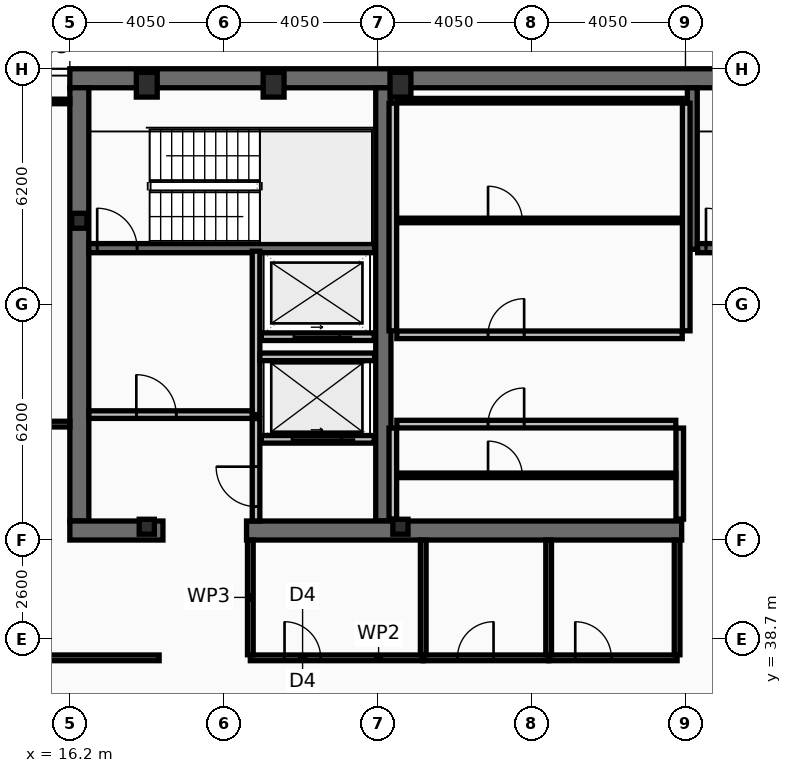
"""IFC4 building model, lengths in metres.
Left out: names, types, materials, properties, quantities, classifications, styles, units other than length and angle.
Written with IfcOpenShell. Run it as: python <this file> out.ifc"""

import sys

from ifc_helpers import new_model, si_unit, direction, frame, frame_2d, origin, origin_2d, place, context, subcontext, project, spatial, rectangle, hollow_rectangle, i_section, extrude, element, fill, save


model = new_model("IFC4")
c1 = context("Model", 3, precision=1e-05, world=origin(), true_north=direction((0.0, 1.0)))
c2 = subcontext(c1, "Body", "Model", "MODEL_VIEW")
j1 = project(units=[si_unit("LENGTHUNIT", "METRE"), si_unit("PLANEANGLEUNIT", "RADIAN")], contexts=[c1])
p1 = place(None, origin())
s1 = spatial("IfcSite", under=j1, at=p1, CompositionType="ELEMENT")
p2 = place(p1, origin())
s2 = spatial("IfcBuilding", under=s1, at=p2, CompositionType="ELEMENT")
p3 = place(p2, frame((0.0, 0.0, 332.6)))
s3 = spatial("IfcBuildingStorey", under=s2, at=p3, CompositionType="ELEMENT", Elevation=332.6)
p4 = place(p3, frame((16.2, 53.45, 0.0), z_axis=(0.0, 0.0, 1.0), x_axis=(1.0, 0.0, 0.0)))
e1 = element("IfcWall", 1, at=p4, inside=s3, PredefinedType="SHEAR", context=c2, shape_type="SweptSolid", body=[
    extrude(rectangle(XDim=40.5, YDim=0.5, at=frame_2d((20.25, 0.0))), origin(), (0.0, 0.0, 1.0), 3.44),
])
p5 = place(p3, frame((16.45, 41.8, 0.0), z_axis=(0.0, 0.0, 1.0), x_axis=(0.0, 1.0, 0.0)))
e2 = element("IfcWall", 2, at=p5, inside=s3, PredefinedType="SHEAR", context=c2, shape_type="SweptSolid", body=[
    extrude(rectangle(XDim=11.4, YDim=0.5, at=frame_2d((5.7, 0.0))), origin(), (0.0, 0.0, 1.0), 3.44),
])
p6 = place(p3, frame((24.45, 41.8, 0.0), z_axis=(0.0, 0.0, 1.0), x_axis=(0.0, 1.0, 0.0)))
e3 = element("IfcWall", 3, at=p6, inside=s3, PredefinedType="SHEAR", context=c2, shape_type="SweptSolid", body=[
    extrude(rectangle(XDim=11.4, YDim=0.4, at=frame_2d((5.7, 0.0))), origin(), (0.0, 0.0, 1.0), 3.44),
])
p7 = place(p3, frame((18.65, 41.55, 0.0), z_axis=(0.0, 0.0, 1.0), x_axis=(-1.0, 0.0, 0.0)))
e4 = element("IfcWall", 4, at=p7, inside=s3, PredefinedType="SHEAR", context=c2, shape_type="SweptSolid", body=[
    extrude(rectangle(XDim=2.45, YDim=0.5, at=frame_2d((1.225, 0.0))), origin(), (0.0, 0.0, 1.0), 3.44),
])
p8 = place(p3, frame((32.3, 41.55, 0.0), z_axis=(0.0, 0.0, 1.0), x_axis=(-1.0, 0.0, 0.0)))
e5 = element("IfcWall", 5, at=p8, inside=s3, PredefinedType="SHEAR", context=c2, shape_type="SweptSolid", body=[
    extrude(rectangle(XDim=11.45, YDim=0.5, at=frame_2d((5.725, 0.0))), origin(), (0.0, 0.0, 1.0), 3.44),
])
p9 = place(p3, frame((32.58, 48.95, 0.0), z_axis=(0.0, 0.0, 1.0), x_axis=(0.0, 1.0, 0.0)))
e6 = element("IfcWall", 6, at=p9, inside=s3, PredefinedType="SHEAR", context=c2, shape_type="SweptSolid", body=[
    extrude(rectangle(XDim=4.25, YDim=0.26, at=frame_2d((2.125, 0.0))), origin(), (0.0, 0.0, 1.0), 3.44),
])
p10 = place(p3, frame((16.7, 48.98, 0.0), z_axis=(0.0, 0.0, 1.0), x_axis=(1.0, 0.0, 0.0)))
e7 = element("IfcWall", 7, at=p10, inside=s3, PredefinedType="SHEAR", context=c2, shape_type="SweptSolid", body=[
    extrude(rectangle(XDim=7.52, YDim=0.24, at=frame_2d((3.76, 0.0))), origin(), (0.0, 0.0, 1.0), 3.44),
])
p11 = place(p10, frame((0.22, 0.0, 0.0)))
e8 = element("IfcOpeningElement", 8, at=p11, cuts=e7, PredefinedType="OPENING", context=c2, shape_type="SweptSolid", body=[
    extrude(rectangle(XDim=1.05, YDim=2.15, at=frame_2d((0.525, 1.075))), frame((0.0, 0.13, 0.0), z_axis=(0.0, -1.0, 0.0), x_axis=(1.0, 0.0, 0.0)), (0.0, 0.0, 1.0), 0.26),
])
p12 = place(p3, frame((32.72, 48.98, 0.0), z_axis=(0.0, 0.0, 1.0), x_axis=(1.0, 0.0, 0.0)))
e9 = element("IfcWall", 9, at=p12, inside=s3, PredefinedType="SHEAR", context=c2, shape_type="SweptSolid", body=[
    extrude(rectangle(XDim=7.56, YDim=0.24, at=frame_2d((3.78, 0.0))), origin(), (0.0, 0.0, 1.0), 3.44),
])
p13 = place(p12, frame((0.22, 0.0, 0.0)))
e10 = element("IfcOpeningElement", 10, at=p13, cuts=e9, PredefinedType="OPENING", context=c2, shape_type="SweptSolid", body=[
    extrude(rectangle(XDim=1.05, YDim=2.15, at=frame_2d((0.525, 1.075))), frame((0.0, 0.13, 0.0), z_axis=(0.0, -1.0, 0.0), x_axis=(1.0, 0.0, 0.0)), (0.0, 0.0, 1.0), 0.26),
])
for number, where, z_axis, x_axis in (
    (11, (18.225, 53.28, 0.0), (0.0, 0.0, 1.0), (1.0, 0.0, 0.0)),
    (12, (21.562, 53.28, 0.0), (0.0, 0.0, 1.0), (1.0, 0.0, 0.0)),
    (13, (24.9, 53.28, 0.0), (0.0, 0.0, 1.0), (1.0, 0.0, 0.0)),
):
    element("IfcColumn", number, at=place(p3, frame(where, z_axis=z_axis, x_axis=x_axis)), inside=s3, PredefinedType="COLUMN", context=c2, shape_type="SweptSolid", body=[
        extrude(hollow_rectangle(XDim=0.55, YDim=0.65, WallThickness=0.04, at=origin_2d()), origin(), (0.0, 0.0, 1.0), 3.6),
    ])
for number, where, z_axis, x_axis in (
    (14, (16.45, 49.7, 0.0), (0.0, 0.0, 1.0), (1.0, 0.0, 0.0)),
    (15, (18.225, 41.65, 0.0), (0.0, 0.0, 1.0), (1.0, 0.0, 0.0)),
    (16, (24.9, 41.65, 0.0), (0.0, 0.0, 1.0), (1.0, 0.0, 0.0)),
):
    element("IfcColumn", number, at=place(p3, frame(where, z_axis=z_axis, x_axis=x_axis)), inside=s3, PredefinedType="COLUMN", context=c2, shape_type="SweptSolid", body=[
        extrude(i_section(OverallWidth=0.399, OverallDepth=0.393, WebThickness=0.023, FlangeThickness=0.037, at=origin_2d()), origin(), (0.0, 0.0, 1.0), 3.6),
    ])
p14 = place(p3, frame((24.21, 43.95, 0.0), z_axis=(0.0, 0.0, 1.0), x_axis=(-1.0, 0.0, 0.0)))
e17 = element("IfcWall", 17, at=p14, inside=s3, PredefinedType="PARTITIONING", context=c2, shape_type="SweptSolid", body=[
    extrude(rectangle(XDim=2.97, YDim=0.2, at=frame_2d((1.485, 0.0))), origin(), (0.0, 0.0, 1.0), 3.44),
])
p15 = place(p14, frame((0.86, 0.0, 0.0)))
e18 = element("IfcOpeningElement", 18, at=p15, cuts=e17, PredefinedType="OPENING", context=c2, shape_type="SweptSolid", body=[
    extrude(rectangle(XDim=1.3, YDim=2.18, at=frame_2d((0.65, 1.09))), frame((0.0, 0.11, 0.0), z_axis=(0.0, -1.0, 0.0), x_axis=(1.0, 0.0, 0.0)), (0.0, 0.0, 1.0), 0.22),
])
p16 = place(p3, frame((24.21, 46.65, 0.0), z_axis=(0.0, 0.0, 1.0), x_axis=(-1.0, 0.0, 0.0)))
e19 = element("IfcWall", 19, at=p16, inside=s3, PredefinedType="PARTITIONING", context=c2, shape_type="SweptSolid", body=[
    extrude(rectangle(XDim=2.97, YDim=0.2, at=frame_2d((1.485, 0.0))), origin(), (0.0, 0.0, 1.0), 3.44),
])
p17 = place(p16, frame((0.91, 0.0, 0.0)))
e20 = element("IfcOpeningElement", 20, at=p17, cuts=e19, PredefinedType="OPENING", context=c2, shape_type="SweptSolid", body=[
    extrude(rectangle(XDim=1.2, YDim=2.18, at=frame_2d((0.6, 1.09))), frame((0.0, 0.11, 0.0), z_axis=(0.0, -1.0, 0.0), x_axis=(1.0, 0.0, 0.0)), (0.0, 0.0, 1.0), 0.22),
])
p18 = place(p3, frame((21.1, 44.6, 0.0), z_axis=(0.0, 0.0, 1.0), x_axis=(0.0, 1.0, 0.0)))
e21 = element("IfcWall", 21, at=p18, inside=s3, PredefinedType="PARTITIONING", context=c2, shape_type="SweptSolid", body=[
    extrude(rectangle(XDim=4.3, YDim=0.2, at=frame_2d((2.15, 0.0))), origin(), (0.0, 0.0, 1.0), 3.44),
])
p19 = place(p3, frame((16.7, 44.6, 0.0), z_axis=(0.0, 0.0, 1.0), x_axis=(1.0, 0.0, 0.0)))
e22 = element("IfcWall", 22, at=p19, inside=s3, PredefinedType="PARTITIONING", context=c2, shape_type="SweptSolid", body=[
    extrude(rectangle(XDim=4.3, YDim=0.2, at=frame_2d((2.15, 0.0))), origin(), (0.0, 0.0, 1.0), 3.44),
])
p20 = place(p19, frame((1.25, 0.0, 0.0)))
e23 = element("IfcOpeningElement", 23, at=p20, cuts=e22, PredefinedType="OPENING", context=c2, shape_type="SweptSolid", body=[
    extrude(rectangle(XDim=1.05, YDim=2.15, at=frame_2d((0.525, 1.075))), frame((0.0, 0.11, 0.0), z_axis=(0.0, -1.0, 0.0), x_axis=(1.0, 0.0, 0.0)), (0.0, 0.0, 1.0), 0.22),
])
p21 = place(p3, frame((21.2, 46.12, 0.0), z_axis=(0.0, 0.0, 1.0), x_axis=(1.0, 0.0, 0.0)))
e24 = element("IfcWall", 24, at=p21, inside=s3, PredefinedType="PARTITIONING", context=c2, shape_type="SweptSolid", body=[
    extrude(rectangle(XDim=3.02, YDim=0.2, at=frame_2d((1.51, 0.0))), origin(), (0.0, 0.0, 1.0), 3.44),
])
p22 = place(p3, frame((21.1, 41.8, 0.0), z_axis=(0.0, 0.0, 1.0), x_axis=(0.0, 1.0, 0.0)))
e25 = element("IfcWall", 25, at=p22, inside=s3, PredefinedType="PARTITIONING", context=c2, shape_type="SweptSolid", body=[
    extrude(rectangle(XDim=2.695, YDim=0.2, at=frame_2d((1.348, 0.0))), origin(), (0.0, 0.0, 1.0), 3.44),
])
p23 = place(p22, frame((0.38, 0.0, 0.0)))
e26 = element("IfcOpeningElement", 26, at=p23, cuts=e25, PredefinedType="OPENING", context=c2, shape_type="SweptSolid", body=[
    extrude(rectangle(XDim=1.05, YDim=2.15, at=frame_2d((0.525, 1.075))), frame((0.0, 0.11, 0.0), z_axis=(0.0, -1.0, 0.0), x_axis=(1.0, 0.0, 0.0)), (0.0, 0.0, 1.0), 0.22),
])
for number, where, z_axis, x_axis in (
    (27, (24.7, 46.805, 0.0), (0.0, 0.0, 1.0), (0.0, 1.0, 0.0)),
    (28, (32.42, 46.805, 0.0), (0.0, 0.0, 1.0), (0.0, 1.0, 0.0)),
):
    element("IfcWall", number, at=place(p3, frame(where, z_axis=z_axis, x_axis=x_axis)), inside=s3, PredefinedType="PARTITIONING", context=c2, shape_type="SweptSolid", body=[
        extrude(rectangle(XDim=5.99, YDim=0.2, at=frame_2d((2.995, 0.0))), origin(), (0.0, 0.0, 1.0), 3.44),
    ])
p24 = place(p3, frame((24.805, 52.86, 0.0), z_axis=(0.0, 0.0, 1.0), x_axis=(1.0, 0.0, 0.0)))
e29 = element("IfcWall", 29, at=p24, inside=s3, PredefinedType="PARTITIONING", context=c2, shape_type="SweptSolid", body=[
    extrude(rectangle(XDim=7.51, YDim=0.12, at=frame_2d((3.755, 0.0))), origin(), (0.0, 0.0, 1.0), 3.44),
])
p25 = place(p3, frame((24.805, 49.709, 0.0), z_axis=(0.0, 0.0, 1.0), x_axis=(1.0, 0.0, 0.0)))
e30 = element("IfcWall", 30, at=p25, inside=s3, PredefinedType="PARTITIONING", context=c2, shape_type="SweptSolid", body=[
    extrude(rectangle(XDim=7.51, YDim=0.12, at=frame_2d((3.755, 0.0))), origin(), (0.0, 0.0, 1.0), 3.44),
])
p26 = place(p25, frame((2.4, 0.0, 0.0)))
e31 = element("IfcOpeningElement", 31, at=p26, cuts=e30, PredefinedType="OPENING", context=c2, shape_type="SweptSolid", body=[
    extrude(rectangle(XDim=0.9, YDim=2.05, at=frame_2d((0.45, 1.025))), frame((0.0, 0.07, 0.0), z_axis=(0.0, -1.0, 0.0), x_axis=(1.0, 0.0, 0.0)), (0.0, 0.0, 1.0), 0.14),
])
p27 = place(p3, frame((24.805, 46.7, 0.0), z_axis=(0.0, 0.0, 1.0), x_axis=(1.0, 0.0, 0.0)))
e32 = element("IfcWall", 32, at=p27, inside=s3, PredefinedType="PARTITIONING", context=c2, shape_type="SweptSolid", body=[
    extrude(rectangle(XDim=7.51, YDim=0.2, at=frame_2d((3.755, 0.0))), origin(), (0.0, 0.0, 1.0), 3.44),
])
p28 = place(p27, frame((2.4, 0.0, 0.0)))
e33 = element("IfcOpeningElement", 33, at=p28, cuts=e32, PredefinedType="OPENING", context=c2, shape_type="SweptSolid", body=[
    extrude(rectangle(XDim=0.95, YDim=2.1, at=frame_2d((0.475, 1.05))), frame((0.0, 0.11, 0.0), z_axis=(0.0, -1.0, 0.0), x_axis=(1.0, 0.0, 0.0)), (0.0, 0.0, 1.0), 0.22),
])
for number, where, z_axis, x_axis in (
    (34, (24.7, 41.85, 0.0), (0.0, 0.0, 1.0), (0.0, 1.0, 0.0)),
    (35, (32.25, 41.85, 0.0), (0.0, 0.0, 1.0), (0.0, 1.0, 0.0)),
):
    element("IfcWall", number, at=place(p3, frame(where, z_axis=z_axis, x_axis=x_axis)), inside=s3, PredefinedType="PARTITIONING", context=c2, shape_type="SweptSolid", body=[
        extrude(rectangle(XDim=2.395, YDim=0.2, at=frame_2d((1.198, 0.0))), origin(), (0.0, 0.0, 1.0), 3.44),
    ])
p29 = place(p3, frame((24.805, 43.002, 0.0), z_axis=(0.0, 0.0, 1.0), x_axis=(1.0, 0.0, 0.0)))
e36 = element("IfcWall", 36, at=p29, inside=s3, PredefinedType="PARTITIONING", context=c2, shape_type="SweptSolid", body=[
    extrude(rectangle(XDim=7.34, YDim=0.12, at=frame_2d((3.67, 0.0))), origin(), (0.0, 0.0, 1.0), 3.44),
])
p30 = place(p29, frame((2.4, 0.0, 0.0)))
e37 = element("IfcOpeningElement", 37, at=p30, cuts=e36, PredefinedType="OPENING", context=c2, shape_type="SweptSolid", body=[
    extrude(rectangle(XDim=0.9, YDim=2.05, at=frame_2d((0.45, 1.025))), frame((0.0, 0.07, 0.0), z_axis=(0.0, -1.0, 0.0), x_axis=(1.0, 0.0, 0.0)), (0.0, 0.0, 1.0), 0.14),
])
p31 = place(p3, frame((24.805, 44.35, 0.0), z_axis=(0.0, 0.0, 1.0), x_axis=(1.0, 0.0, 0.0)))
e38 = element("IfcWall", 38, at=p31, inside=s3, PredefinedType="PARTITIONING", context=c2, shape_type="SweptSolid", body=[
    extrude(rectangle(XDim=7.34, YDim=0.2, at=frame_2d((3.67, 0.0))), origin(), (0.0, 0.0, 1.0), 3.44),
])
p32 = place(p31, frame((2.4, 0.0, 0.0)))
e39 = element("IfcOpeningElement", 39, at=p32, cuts=e38, PredefinedType="OPENING", context=c2, shape_type="SweptSolid", body=[
    extrude(rectangle(XDim=0.95, YDim=2.1, at=frame_2d((0.475, 1.05))), frame((0.0, 0.11, 0.0), z_axis=(0.0, -1.0, 0.0), x_axis=(1.0, 0.0, 0.0)), (0.0, 0.0, 1.0), 0.22),
])
p33 = place(p3, frame((20.95, 38.2, 0.0), z_axis=(0.0, 0.0, 1.0), x_axis=(1.0, 0.0, 0.0)))
e40 = element("IfcWall", 40, at=p33, inside=s3, PredefinedType="PARTITIONING", context=c2, shape_type="SweptSolid", body=[
    extrude(rectangle(XDim=4.55, YDim=0.15, at=frame_2d((2.275, 0.0))), origin(), (0.0, 0.0, 1.0), 2.83),
])
p34 = place(p33, frame((0.9, 0.0, 0.0)))
e41 = element("IfcOpeningElement", 41, at=p34, cuts=e40, PredefinedType="OPENING", context=c2, shape_type="SweptSolid", body=[
    extrude(rectangle(XDim=0.95, YDim=2.05, at=frame_2d((0.475, 1.025))), frame((0.0, 0.085, 0.0), z_axis=(0.0, -1.0, 0.0), x_axis=(1.0, 0.0, 0.0)), (0.0, 0.0, 1.0), 0.17),
])
p35 = place(p3, frame((25.5, 38.2, 0.0), z_axis=(0.0, 0.0, 1.0), x_axis=(1.0, 0.0, 0.0)))
e42 = element("IfcWall", 42, at=p35, inside=s3, PredefinedType="PARTITIONING", context=c2, shape_type="SweptSolid", body=[
    extrude(rectangle(XDim=3.3, YDim=0.15, at=frame_2d((1.65, 0.0))), origin(), (0.0, 0.0, 1.0), 3.44),
])
p36 = place(p35, frame((0.9, 0.0, 0.0)))
e43 = element("IfcOpeningElement", 43, at=p36, cuts=e42, PredefinedType="OPENING", context=c2, shape_type="SweptSolid", body=[
    extrude(rectangle(XDim=0.95, YDim=2.05, at=frame_2d((0.475, 1.025))), frame((0.0, 0.085, 0.0), z_axis=(0.0, -1.0, 0.0), x_axis=(1.0, 0.0, 0.0)), (0.0, 0.0, 1.0), 0.17),
])
p37 = place(p3, frame((28.8, 38.2, 0.0), z_axis=(0.0, 0.0, 1.0), x_axis=(1.0, 0.0, 0.0)))
e44 = element("IfcWall", 44, at=p37, inside=s3, PredefinedType="PARTITIONING", context=c2, shape_type="SweptSolid", body=[
    extrude(rectangle(XDim=3.38, YDim=0.15, at=frame_2d((1.69, 0.0))), origin(), (0.0, 0.0, 1.0), 3.44),
])
p38 = place(p37, frame((0.7, 0.0, 0.0)))
e45 = element("IfcOpeningElement", 45, at=p38, cuts=e44, PredefinedType="OPENING", context=c2, shape_type="SweptSolid", body=[
    extrude(rectangle(XDim=0.95, YDim=2.05, at=frame_2d((0.475, 1.025))), frame((0.0, 0.085, 0.0), z_axis=(0.0, -1.0, 0.0), x_axis=(1.0, 0.0, 0.0)), (0.0, 0.0, 1.0), 0.17),
])
for number, where, z_axis, x_axis in (
    (46, (20.95, 38.28, 0.0), (0.0, 0.0, 1.0), (0.0, 1.0, 0.0)),
    (47, (25.5, 38.28, 0.0), (0.0, 0.0, 1.0), (0.0, 1.0, 0.0)),
    (48, (28.8, 38.28, 0.0), (0.0, 0.0, 1.0), (0.0, 1.0, 0.0)),
    (49, (32.18, 38.28, 0.0), (0.0, 0.0, 1.0), (0.0, 1.0, 0.0)),
):
    element("IfcWall", number, at=place(p3, frame(where, z_axis=z_axis, x_axis=x_axis)), inside=s3, PredefinedType="PARTITIONING", context=c2, shape_type="SweptSolid", body=[
        extrude(rectangle(XDim=3.02, YDim=0.15, at=frame_2d((1.51, 0.0))), origin(), (0.0, 0.0, 1.0), 3.44),
    ])
p39 = place(p3, frame((12.03, 38.2, 0.0), z_axis=(0.0, 0.0, 1.0), x_axis=(1.0, 0.0, 0.0)))
e50 = element("IfcWall", 50, at=p39, inside=s3, PredefinedType="PARTITIONING", context=c2, shape_type="SweptSolid", body=[
    extrude(rectangle(XDim=6.52, YDim=0.15, at=frame_2d((3.26, 0.0))), origin(), (0.0, 0.0, 1.0), 2.83),
])
p40 = place(p39, frame((2.32, 0.0, 0.0)))
e51 = element("IfcOpeningElement", 51, at=p40, cuts=e50, PredefinedType="OPENING", context=c2, shape_type="SweptSolid", body=[
    extrude(rectangle(XDim=0.95, YDim=2.05, at=frame_2d((0.475, 1.025))), frame((0.0, 0.085, 0.0), z_axis=(0.0, -1.0, 0.0), x_axis=(1.0, 0.0, 0.0)), (0.0, 0.0, 1.0), 0.17),
])
p41 = place(p3, frame((12.095, 44.35, 0.0), z_axis=(0.0, 0.0, 1.0), x_axis=(1.0, 0.0, 0.0)))
e52 = element("IfcWall", 52, at=p41, inside=s3, PredefinedType="PARTITIONING", context=c2, shape_type="SweptSolid", body=[
    extrude(rectangle(XDim=4.105, YDim=0.15, at=frame_2d((2.052, 0.0))), origin(), (0.0, 0.0, 1.0), 2.88),
])
p42 = place(p41, frame((2.32, 0.0, 0.0)))
e53 = element("IfcOpeningElement", 53, at=p42, cuts=e52, PredefinedType="OPENING", context=c2, shape_type="SweptSolid", body=[
    extrude(rectangle(XDim=0.9, YDim=2.05, at=frame_2d((0.45, 1.025))), frame((0.0, 0.085, 0.0), z_axis=(0.0, -1.0, 0.0), x_axis=(1.0, 0.0, 0.0)), (0.0, 0.0, 1.0), 0.17),
])
p43 = place(p3, frame((12.095, 52.84, 0.0), z_axis=(0.0, 0.0, 1.0), x_axis=(1.0, 0.0, 0.0)))
e54 = element("IfcWall", 54, at=p43, inside=s3, PredefinedType="PARTITIONING", context=c2, shape_type="SweptSolid", body=[
    extrude(rectangle(XDim=4.105, YDim=0.12, at=frame_2d((2.052, 0.0))), origin(), (0.0, 0.0, 1.0), 3.44),
])
p44 = place(p11, origin())
e55 = element("IfcDoor", 55, at=p44, inside=s3, OperationType="SINGLE_SWING_LEFT", PredefinedType="DOOR", context=c2, shape_type="SweptSolid", body=[
    extrude(rectangle(XDim=1.05, YDim=2.15, at=frame_2d((0.525, 1.075))), frame((0.0, 0.025, 0.0), z_axis=(0.0, -1.0, 0.0), x_axis=(1.0, 0.0, 0.0)), (0.0, 0.0, 1.0), 0.05),
])
fill(e8, e55)
p45 = place(p13, origin())
e56 = element("IfcDoor", 56, at=p45, inside=s3, OperationType="SINGLE_SWING_LEFT", PredefinedType="DOOR", context=c2, shape_type="SweptSolid", body=[
    extrude(rectangle(XDim=1.05, YDim=2.15, at=frame_2d((0.525, 1.075))), frame((0.0, 0.025, 0.0), z_axis=(0.0, -1.0, 0.0), x_axis=(1.0, 0.0, 0.0)), (0.0, 0.0, 1.0), 0.05),
])
fill(e10, e56)
p46 = place(p15, origin())
e57 = element("IfcDoor", 57, at=p46, inside=s3, OperationType="SLIDING_TO_LEFT", PredefinedType="DOOR", context=c2, shape_type="SweptSolid", body=[
    extrude(rectangle(XDim=1.3, YDim=2.18, at=frame_2d((0.65, 1.09))), frame((0.0, 0.025, 0.0), z_axis=(0.0, -1.0, 0.0), x_axis=(1.0, 0.0, 0.0)), (0.0, 0.0, 1.0), 0.05),
])
fill(e18, e57)
p47 = place(p17, origin())
e58 = element("IfcDoor", 58, at=p47, inside=s3, OperationType="SLIDING_TO_LEFT", PredefinedType="DOOR", context=c2, shape_type="SweptSolid", body=[
    extrude(rectangle(XDim=1.2, YDim=2.18, at=frame_2d((0.6, 1.09))), frame((0.0, 0.025, 0.0), z_axis=(0.0, -1.0, 0.0), x_axis=(1.0, 0.0, 0.0)), (0.0, 0.0, 1.0), 0.05),
])
fill(e20, e58)
p48 = place(p20, origin())
e59 = element("IfcDoor", 59, at=p48, inside=s3, OperationType="SINGLE_SWING_LEFT", PredefinedType="DOOR", context=c2, shape_type="SweptSolid", body=[
    extrude(rectangle(XDim=1.05, YDim=2.15, at=frame_2d((0.525, 1.075))), frame((0.0, 0.025, 0.0), z_axis=(0.0, -1.0, 0.0), x_axis=(1.0, 0.0, 0.0)), (0.0, 0.0, 1.0), 0.05),
])
fill(e23, e59)
p49 = place(p23, origin())
e60 = element("IfcDoor", 60, at=p49, inside=s3, OperationType="SINGLE_SWING_RIGHT", PredefinedType="DOOR", context=c2, shape_type="SweptSolid", body=[
    extrude(rectangle(XDim=1.05, YDim=2.15, at=frame_2d((0.525, 1.075))), frame((0.0, 0.025, 0.0), z_axis=(0.0, -1.0, 0.0), x_axis=(1.0, 0.0, 0.0)), (0.0, 0.0, 1.0), 0.05),
])
fill(e26, e60)
p50 = place(p26, origin())
e61 = element("IfcDoor", 61, at=p50, inside=s3, OperationType="SINGLE_SWING_LEFT", PredefinedType="DOOR", context=c2, shape_type="SweptSolid", body=[
    extrude(rectangle(XDim=0.9, YDim=2.05, at=frame_2d((0.45, 1.025))), frame((0.0, 0.025, 0.0), z_axis=(0.0, -1.0, 0.0), x_axis=(1.0, 0.0, 0.0)), (0.0, 0.0, 1.0), 0.05),
])
fill(e31, e61)
p51 = place(p28, origin())
e62 = element("IfcDoor", 62, at=p51, inside=s3, OperationType="SINGLE_SWING_RIGHT", PredefinedType="DOOR", context=c2, shape_type="SweptSolid", body=[
    extrude(rectangle(XDim=0.95, YDim=2.1, at=frame_2d((0.475, 1.05))), frame((0.0, 0.025, 0.0), z_axis=(0.0, -1.0, 0.0), x_axis=(1.0, 0.0, 0.0)), (0.0, 0.0, 1.0), 0.05),
])
fill(e33, e62)
p52 = place(p30, origin())
e63 = element("IfcDoor", 63, at=p52, inside=s3, OperationType="SINGLE_SWING_LEFT", PredefinedType="DOOR", context=c2, shape_type="SweptSolid", body=[
    extrude(rectangle(XDim=0.9, YDim=2.05, at=frame_2d((0.45, 1.025))), frame((0.0, 0.025, 0.0), z_axis=(0.0, -1.0, 0.0), x_axis=(1.0, 0.0, 0.0)), (0.0, 0.0, 1.0), 0.05),
])
fill(e37, e63)
p53 = place(p32, origin())
e64 = element("IfcDoor", 64, at=p53, inside=s3, OperationType="SINGLE_SWING_RIGHT", PredefinedType="DOOR", context=c2, shape_type="SweptSolid", body=[
    extrude(rectangle(XDim=0.95, YDim=2.1, at=frame_2d((0.475, 1.05))), frame((0.0, 0.025, 0.0), z_axis=(0.0, -1.0, 0.0), x_axis=(1.0, 0.0, 0.0)), (0.0, 0.0, 1.0), 0.05),
])
fill(e39, e64)
p54 = place(p34, origin())
e65 = element("IfcDoor", 65, at=p54, inside=s3, OperationType="SINGLE_SWING_LEFT", PredefinedType="DOOR", context=c2, shape_type="SweptSolid", body=[
    extrude(rectangle(XDim=0.95, YDim=2.05, at=frame_2d((0.475, 1.025))), frame((0.0, 0.025, 0.0), z_axis=(0.0, -1.0, 0.0), x_axis=(1.0, 0.0, 0.0)), (0.0, 0.0, 1.0), 0.05),
])
fill(e41, e65)
p55 = place(p36, origin())
e66 = element("IfcDoor", 66, at=p55, inside=s3, OperationType="SINGLE_SWING_RIGHT", PredefinedType="DOOR", context=c2, shape_type="SweptSolid", body=[
    extrude(rectangle(XDim=0.95, YDim=2.05, at=frame_2d((0.475, 1.025))), frame((0.0, 0.025, 0.0), z_axis=(0.0, -1.0, 0.0), x_axis=(1.0, 0.0, 0.0)), (0.0, 0.0, 1.0), 0.05),
])
fill(e43, e66)
p56 = place(p38, origin())
e67 = element("IfcDoor", 67, at=p56, inside=s3, OperationType="SINGLE_SWING_LEFT", PredefinedType="DOOR", context=c2, shape_type="SweptSolid", body=[
    extrude(rectangle(XDim=0.95, YDim=2.05, at=frame_2d((0.475, 1.025))), frame((0.0, 0.025, 0.0), z_axis=(0.0, -1.0, 0.0), x_axis=(1.0, 0.0, 0.0)), (0.0, 0.0, 1.0), 0.05),
])
fill(e45, e67)
save(model, sys.argv[1])
